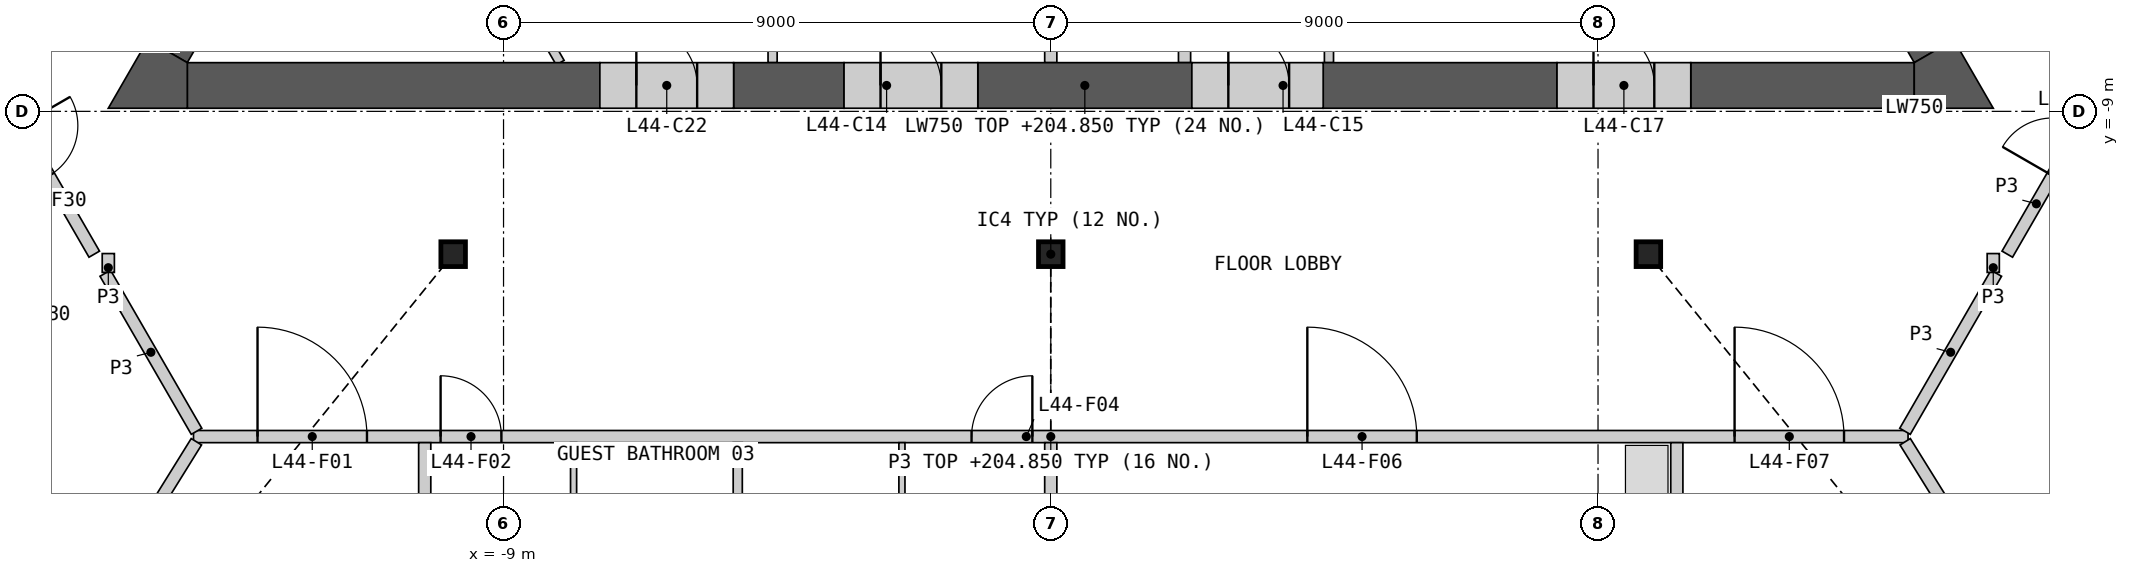
"""IFC4 building model, lengths in metres.
Left out: names, types, materials, properties, quantities, classifications, styles, units other than length and angle.
Written with IfcOpenShell. Run it as: python <this file> out.ifc"""

import sys

from ifc_helpers import new_model, si_unit, direction, frame, frame_2d, origin, origin_2d, place, context, subcontext, project, spatial, polyline, rectangle, i_section, outline, extrude, element, fill, save


model = new_model("IFC4")
c1 = context("Model", 3, precision=1e-05, world=origin(), true_north=direction((0.0, 1.0)))
c2 = subcontext(c1, "Body", "Model", "MODEL_VIEW")
j1 = project(units=[si_unit("LENGTHUNIT", "METRE"), si_unit("PLANEANGLEUNIT", "RADIAN")], contexts=[c1])
p1 = place(None, origin())
s1 = spatial("IfcSite", under=j1, at=p1, CompositionType="ELEMENT")
p2 = place(p1, origin())
s2 = spatial("IfcBuilding", under=s1, at=p2, CompositionType="ELEMENT")
p3 = place(p2, frame((0.0, 0.0, 201.6)))
s3 = spatial("IfcBuildingStorey", under=s2, at=p3, CompositionType="ELEMENT", Elevation=201.6)
for number, where, z_axis, x_axis in (
    (1, (-9.828, -11.349, 0.0), (0.0, 0.0, 1.0), (1.0, 0.0, 0.0)),
    (2, (0.0, -11.349, 0.0), (0.0, 0.0, 1.0), (1.0, 0.0, 0.0)),
    (3, (9.828, -11.349, 0.0), (0.0, 0.0, 1.0), (1.0, 0.0, 0.0)),
):
    element("IfcColumn", number, at=place(p3, frame(where, z_axis=z_axis, x_axis=x_axis)), inside=s3, PredefinedType="COLUMN", context=c2, shape_type="SweptSolid", body=[
        extrude(i_section(OverallWidth=0.404, OverallDepth=0.407, WebThickness=0.027, FlangeThickness=0.044, at=origin_2d()), origin(), (0.0, 0.0, 1.0), 3.6),
    ])
for number, where, z_axis, x_axis in (
    (4, (0.0, -6.906, 0.0), (0.0, 0.0, 1.0), (0.0, -1.0, 0.0)),
    (5, (2.2, -6.906, 0.0), (0.0, 0.0, 1.0), (0.0, -1.0, 0.0)),
):
    element("IfcWall", number, at=place(p3, frame(where, z_axis=z_axis, x_axis=x_axis)), inside=s3, PredefinedType="SHEAR", context=c2, shape_type="SweptSolid", body=[
        extrude(rectangle(XDim=1.293, YDim=0.2, at=frame_2d((0.646, 0.0))), origin(), (0.0, 0.0, 1.0), 3.25),
    ])
for number, where, z_axis, x_axis in (
    (6, (4.575, -6.906, 0.0), (0.0, 0.0, 1.0), (0.0, -1.0, 0.0)),
    (7, (-4.575, -6.906, 0.0), (0.0, 0.0, 1.0), (0.0, -1.0, 0.0)),
):
    element("IfcWall", number, at=place(p3, frame(where, z_axis=z_axis, x_axis=x_axis)), inside=s3, PredefinedType="PARTITIONING", context=c2, shape_type="SweptSolid", body=[
        extrude(rectangle(XDim=1.293, YDim=0.15, at=frame_2d((0.646, 0.0))), origin(), (0.0, 0.0, 1.0), 3.25),
    ])
p4 = place(p3, frame((-8.83, -6.881, 0.0), z_axis=(0.0, 0.0, 1.0), x_axis=(0.500037110984, -0.866003976688, 0.0)))
e8 = element("IfcWall", 8, at=p4, inside=s3, PredefinedType="PARTITIONING", context=c2, shape_type="SweptSolid", body=[
    extrude(rectangle(XDim=1.522, YDim=0.15, at=frame_2d((0.761, 0.0))), origin(), (0.0, 0.0, 1.0), 3.25),
])
p5 = place(p3, frame((-14.201, -8.574, 0.0), z_axis=(0.0, 0.0, 1.0), x_axis=(1.0, 0.0, 0.0)))
e9 = element("IfcWall", 9, at=p5, inside=s3, PredefinedType="SHEAR", context=c2, shape_type="SweptSolid", body=[
    extrude(rectangle(XDim=6.785, YDim=0.75, at=frame_2d((3.393, 0.0))), origin(), (0.0, 0.0, 1.0), 3.25),
])
p6 = place(p3, frame((4.48, -8.574, 0.0), z_axis=(0.0, 0.0, 1.0), x_axis=(1.0, 0.0, 0.0)))
e10 = element("IfcWall", 10, at=p6, inside=s3, PredefinedType="SHEAR", context=c2, shape_type="SweptSolid", body=[
    extrude(rectangle(XDim=3.845, YDim=0.75, at=frame_2d((1.923, 0.0))), origin(), (0.0, 0.0, 1.0), 3.25),
])
p7 = place(p3, frame((10.525, -8.574, 0.0), z_axis=(0.0, 0.0, 1.0), x_axis=(1.0, 0.0, 0.0)))
e11 = element("IfcWall", 11, at=p7, inside=s3, PredefinedType="SHEAR", context=c2, shape_type="SweptSolid", body=[
    extrude(rectangle(XDim=3.676, YDim=0.75, at=frame_2d((1.838, 0.0))), origin(), (0.0, 0.0, 1.0), 3.25),
])
p8 = place(p3, frame((-1.2, -8.574, 0.0), z_axis=(0.0, 0.0, 1.0), x_axis=(1.0, 0.0, 0.0)))
e12 = element("IfcWall", 12, at=p8, inside=s3, PredefinedType="SHEAR", context=c2, shape_type="SweptSolid", body=[
    extrude(rectangle(XDim=3.52, YDim=0.75, at=frame_2d((1.76, 0.0))), origin(), (0.0, 0.0, 1.0), 3.25),
])
p9 = place(p3, frame((-5.216, -8.574, 0.0), z_axis=(0.0, 0.0, 1.0), x_axis=(1.0, 0.0, 0.0)))
e13 = element("IfcWall", 13, at=p9, inside=s3, PredefinedType="SHEAR", context=c2, shape_type="SweptSolid", body=[
    extrude(rectangle(XDim=1.816, YDim=0.75, at=frame_2d((0.908, 0.0))), origin(), (0.0, 0.0, 1.0), 3.25),
])
p10 = place(p3, frame((14.526, -8.011, 0.0), z_axis=(0.0, 0.0, 1.0), x_axis=(-0.499996012963, 0.866027705689, 0.0)))
e14 = element("IfcWall", 14, at=p10, inside=s3, PredefinedType="SHEAR", context=c2, shape_type="SweptSolid", body=[
    extrude(rectangle(XDim=15.039, YDim=0.75, at=frame_2d((7.519, 0.0))), origin(), (0.0, 0.0, 1.0), 3.25),
])
p11 = place(p3, frame((-13.564, -6.346, 0.0), z_axis=(0.0, 0.0, 1.0), x_axis=(-0.499989888488, -0.86603124159, 0.0)))
e15 = element("IfcWall", 15, at=p11, inside=s3, PredefinedType="SHEAR", context=c2, shape_type="SweptSolid", body=[
    extrude(rectangle(XDim=1.923, YDim=0.75, at=frame_2d((0.961, 0.0))), origin(), (0.0, 0.0, 1.0), 3.25),
])
p12 = place(p3, origin())
e16 = element("IfcWall", 16, at=p12, inside=s3, PredefinedType="SHEAR", context=c2, shape_type="SweptSolid", body=[
    extrude(outline(polyline([(14.201, -8.949), (14.201, -8.199), (14.851, -7.824), (15.5, -8.949), (14.201, -8.949)])), origin(), (0.0, 0.0, 1.0), 3.25),
])
p13 = place(p3, origin())
e17 = element("IfcWall", 17, at=p13, inside=s3, PredefinedType="SHEAR", context=c2, shape_type="SweptSolid", body=[
    extrude(outline(polyline([(-14.851, -7.824), (-14.201, -8.199), (-14.201, -8.949), (-15.5, -8.949), (-14.851, -7.824)])), origin(), (0.0, 0.0, 1.0), 3.25),
])
p14 = place(p3, frame((-3.4, -8.574, 0.0), z_axis=(0.0, 0.0, 1.0), x_axis=(1.0, 0.0, 0.0)))
e18 = element("IfcWall", 18, at=p14, inside=s3, PredefinedType="SHEAR", context=c2, shape_type="SweptSolid", body=[
    extrude(rectangle(XDim=2.2, YDim=0.75, at=frame_2d((1.1, 0.0))), origin(), (0.0, 0.0, 1.0), 3.25),
])
p15 = place(p14, frame((0.6, 0.0, 0.0)))
e19 = element("IfcOpeningElement", 19, at=p15, cuts=e18, PredefinedType="OPENING", context=c2, shape_type="SweptSolid", body=[
    extrude(rectangle(XDim=1.0, YDim=2.1, at=frame_2d((0.5, 1.05))), frame((0.0, 0.385, 0.0), z_axis=(0.0, -1.0, 0.0), x_axis=(1.0, 0.0, 0.0)), (0.0, 0.0, 1.0), 0.77),
])
p16 = place(p3, frame((2.32, -8.574, 0.0), z_axis=(0.0, 0.0, 1.0), x_axis=(1.0, 0.0, 0.0)))
e20 = element("IfcWall", 20, at=p16, inside=s3, PredefinedType="SHEAR", context=c2, shape_type="SweptSolid", body=[
    extrude(rectangle(XDim=2.16, YDim=0.75, at=frame_2d((1.08, 0.0))), origin(), (0.0, 0.0, 1.0), 3.25),
])
p17 = place(p16, frame((0.6, 0.0, 0.0)))
e21 = element("IfcOpeningElement", 21, at=p17, cuts=e20, PredefinedType="OPENING", context=c2, shape_type="SweptSolid", body=[
    extrude(rectangle(XDim=1.0, YDim=2.1, at=frame_2d((0.5, 1.05))), frame((0.0, 0.385, 0.0), z_axis=(0.0, -1.0, 0.0), x_axis=(1.0, 0.0, 0.0)), (0.0, 0.0, 1.0), 0.77),
])
p18 = place(p3, frame((8.325, -8.574, 0.0), z_axis=(0.0, 0.0, 1.0), x_axis=(1.0, 0.0, 0.0)))
e22 = element("IfcWall", 22, at=p18, inside=s3, PredefinedType="SHEAR", context=c2, shape_type="SweptSolid", body=[
    extrude(rectangle(XDim=2.2, YDim=0.75, at=frame_2d((1.1, 0.0))), origin(), (0.0, 0.0, 1.0), 3.25),
])
p19 = place(p18, frame((0.6, 0.0, 0.0)))
e23 = element("IfcOpeningElement", 23, at=p19, cuts=e22, PredefinedType="OPENING", context=c2, shape_type="SweptSolid", body=[
    extrude(rectangle(XDim=1.0, YDim=2.1, at=frame_2d((0.5, 1.05))), frame((0.0, 0.385, 0.0), z_axis=(0.0, -1.0, 0.0), x_axis=(1.0, 0.0, 0.0)), (0.0, 0.0, 1.0), 0.77),
])
p20 = place(p3, frame((-7.416, -8.574, 0.0), z_axis=(0.0, 0.0, 1.0), x_axis=(1.0, 0.0, 0.0)))
e24 = element("IfcWall", 24, at=p20, inside=s3, PredefinedType="SHEAR", context=c2, shape_type="SweptSolid", body=[
    extrude(rectangle(XDim=2.2, YDim=0.75, at=frame_2d((1.1, 0.0))), origin(), (0.0, 0.0, 1.0), 3.25),
])
p21 = place(p20, frame((0.6, 0.0, 0.0)))
e25 = element("IfcOpeningElement", 25, at=p21, cuts=e24, PredefinedType="OPENING", context=c2, shape_type="SweptSolid", body=[
    extrude(rectangle(XDim=1.0, YDim=2.1, at=frame_2d((0.5, 1.05))), frame((0.0, 0.385, 0.0), z_axis=(0.0, -1.0, 0.0), x_axis=(1.0, 0.0, 0.0)), (0.0, 0.0, 1.0), 0.77),
])
p22 = place(p3, frame((-14.099, -14.349, 0.0), z_axis=(0.0, 0.0, 1.0), x_axis=(1.0, 0.0, 0.0)))
e26 = element("IfcWall", 26, at=p22, inside=s3, PredefinedType="PARTITIONING", context=c2, shape_type="SweptSolid", body=[
    extrude(rectangle(XDim=28.198, YDim=0.2, at=frame_2d((14.099, 0.0))), origin(), (0.0, 0.0, 1.0), 3.25),
])
p23 = place(p22, frame((1.053, 0.0, 0.0)))
e27 = element("IfcOpeningElement", 27, at=p23, cuts=e26, PredefinedType="OPENING", context=c2, shape_type="SweptSolid", body=[
    extrude(rectangle(XDim=1.8, YDim=2.1, at=frame_2d((0.9, 1.05))), frame((0.0, 0.11, 0.0), z_axis=(0.0, -1.0, 0.0), x_axis=(1.0, 0.0, 0.0)), (0.0, 0.0, 1.0), 0.22),
])
p24 = place(p22, frame((4.064, 0.0, 0.0)))
e28 = element("IfcOpeningElement", 28, at=p24, cuts=e26, PredefinedType="OPENING", context=c2, shape_type="SweptSolid", body=[
    extrude(rectangle(XDim=1.0, YDim=2.1, at=frame_2d((0.5, 1.05))), frame((0.0, 0.11, 0.0), z_axis=(0.0, -1.0, 0.0), x_axis=(1.0, 0.0, 0.0)), (0.0, 0.0, 1.0), 0.22),
])
p25 = place(p22, frame((12.796, 0.0, 0.0)))
e29 = element("IfcOpeningElement", 29, at=p25, cuts=e26, PredefinedType="OPENING", context=c2, shape_type="SweptSolid", body=[
    extrude(rectangle(XDim=1.0, YDim=2.1, at=frame_2d((0.5, 1.05))), frame((0.0, 0.11, 0.0), z_axis=(0.0, -1.0, 0.0), x_axis=(1.0, 0.0, 0.0)), (0.0, 0.0, 1.0), 0.22),
])
p26 = place(p22, frame((18.318, 0.0, 0.0)))
e30 = element("IfcOpeningElement", 30, at=p26, cuts=e26, PredefinedType="OPENING", context=c2, shape_type="SweptSolid", body=[
    extrude(rectangle(XDim=1.8, YDim=2.1, at=frame_2d((0.9, 1.05))), frame((0.0, 0.11, 0.0), z_axis=(0.0, -1.0, 0.0), x_axis=(1.0, 0.0, 0.0)), (0.0, 0.0, 1.0), 0.22),
])
p27 = place(p22, frame((25.345, 0.0, 0.0)))
e31 = element("IfcOpeningElement", 31, at=p27, cuts=e26, PredefinedType="OPENING", context=c2, shape_type="SweptSolid", body=[
    extrude(rectangle(XDim=1.8, YDim=2.1, at=frame_2d((0.9, 1.05))), frame((0.0, 0.11, 0.0), z_axis=(0.0, -1.0, 0.0), x_axis=(1.0, 0.0, 0.0)), (0.0, 0.0, 1.0), 0.22),
])
p28 = place(p3, frame((14.971, -3.233, 0.0), z_axis=(0.0, 0.0, 1.0), x_axis=(0.500003221507, -0.866023543838, 0.0)))
e32 = element("IfcWall", 32, at=p28, inside=s3, PredefinedType="PARTITIONING", context=c2, shape_type="SweptSolid", body=[
    extrude(rectangle(XDim=5.545, YDim=0.2, at=frame_2d((2.772, 0.0))), origin(), (0.0, 0.0, 1.0), 3.25),
])
p29 = place(p28, frame((4.094, 0.0, 0.0)))
e33 = element("IfcOpeningElement", 33, at=p29, cuts=e32, PredefinedType="OPENING", context=c2, shape_type="SweptSolid", body=[
    extrude(rectangle(XDim=1.1, YDim=2.1, at=frame_2d((0.55, 1.05))), frame((0.0, 0.11, 0.0), z_axis=(0.0, -1.0, 0.0), x_axis=(1.0, 0.0, 0.0)), (0.0, 0.0, 1.0), 0.22),
])
p30 = place(p3, frame((-17.744, -8.035, 0.0), z_axis=(0.0, 0.0, 1.0), x_axis=(0.500003221507, 0.866023543838, 0.0)))
e34 = element("IfcWall", 34, at=p30, inside=s3, PredefinedType="PARTITIONING", context=c2, shape_type="SweptSolid", body=[
    extrude(rectangle(XDim=5.545, YDim=0.2, at=frame_2d((2.772, 0.0))), origin(), (0.0, 0.0, 1.0), 3.25),
])
p31 = place(p30, frame((0.351, 0.0, 0.0)))
e35 = element("IfcOpeningElement", 35, at=p31, cuts=e34, PredefinedType="OPENING", context=c2, shape_type="SweptSolid", body=[
    extrude(rectangle(XDim=1.1, YDim=2.1, at=frame_2d((0.55, 1.05))), frame((0.0, 0.11, 0.0), z_axis=(0.0, -1.0, 0.0), x_axis=(1.0, 0.0, 0.0)), (0.0, 0.0, 1.0), 0.22),
])
p32 = place(p3, frame((15.731, -11.349, 0.0), z_axis=(0.0, 0.0, 1.0), x_axis=(0.499961815444, 0.866047448526, 0.0)))
e36 = element("IfcWall", 36, at=p32, inside=s3, PredefinedType="PARTITIONING", context=c2, shape_type="SweptSolid", body=[
    extrude(rectangle(XDim=3.826, YDim=0.2, at=frame_2d((1.913, 0.0))), origin(), (0.0, 0.0, 1.0), 3.25),
])
p33 = place(p32, frame((1.49, 0.0, 0.0)))
e37 = element("IfcOpeningElement", 37, at=p33, cuts=e36, PredefinedType="OPENING", context=c2, shape_type="SweptSolid", body=[
    extrude(rectangle(XDim=0.95, YDim=2.1, at=frame_2d((0.475, 1.05))), frame((0.0, 0.11, 0.0), z_axis=(0.0, -1.0, 0.0), x_axis=(1.0, 0.0, 0.0)), (0.0, 0.0, 1.0), 0.22),
])
p34 = place(p3, frame((-17.644, -8.035, 0.0), z_axis=(0.0, 0.0, 1.0), x_axis=(0.499961815444, -0.866047448526, 0.0)))
e38 = element("IfcWall", 38, at=p34, inside=s3, PredefinedType="PARTITIONING", context=c2, shape_type="SweptSolid", body=[
    extrude(rectangle(XDim=3.826, YDim=0.2, at=frame_2d((1.913, 0.0))), origin(), (0.0, 0.0, 1.0), 3.25),
])
p35 = place(p34, frame((1.386, 0.0, 0.0)))
e39 = element("IfcOpeningElement", 39, at=p35, cuts=e38, PredefinedType="OPENING", context=c2, shape_type="SweptSolid", body=[
    extrude(rectangle(XDim=0.95, YDim=2.1, at=frame_2d((0.475, 1.05))), frame((0.0, 0.11, 0.0), z_axis=(0.0, -1.0, 0.0), x_axis=(1.0, 0.0, 0.0)), (0.0, 0.0, 1.0), 0.22),
])
for number, where, z_axis, x_axis in (
    (40, (14.049, -14.262, 0.0), (0.0, 0.0, 1.0), (0.5, 0.866, 0.0)),
    (41, (-15.55, -11.662, 0.0), (0.0, 0.0, 1.0), (0.5, -0.866, 0.0)),
):
    element("IfcWall", number, at=place(p3, frame(where, z_axis=z_axis, x_axis=x_axis)), inside=s3, PredefinedType="PARTITIONING", context=c2, shape_type="SweptSolid", body=[
        extrude(rectangle(XDim=3.002, YDim=0.2, at=frame_2d((1.501, 0.0))), origin(), (0.0, 0.0, 1.0), 3.25),
    ])
for number, where, z_axis, x_axis in (
    (42, (-15.5, -11.649, 0.0), (0.0, 0.0, 1.0), (0.0, 1.0, 0.0)),
    (43, (15.5, -11.649, 0.0), (0.0, 0.0, 1.0), (0.0, 1.0, 0.0)),
):
    element("IfcWall", number, at=place(p3, frame(where, z_axis=z_axis, x_axis=x_axis)), inside=s3, PredefinedType="PARTITIONING", context=c2, shape_type="SweptSolid", body=[
        extrude(rectangle(XDim=0.31, YDim=0.2, at=frame_2d((0.155, 0.0))), origin(), (0.0, 0.0, 1.0), 3.25),
    ])
p36 = place(p3, frame((14.052, -14.434, 0.0), z_axis=(0.0, 0.0, 1.0), x_axis=(0.527581174538, -0.849504622868, 0.0)))
e44 = element("IfcWall", 44, at=p36, inside=s3, PredefinedType="PARTITIONING", context=c2, shape_type="SweptSolid", body=[
    extrude(rectangle(XDim=11.747, YDim=0.2, at=frame_2d((5.873, 0.0))), origin(), (0.0, 0.0, 1.0), 2.404),
])
p37 = place(p3, frame((-20.117, -24.2, 0.0), z_axis=(0.0, 0.0, 1.0), x_axis=(0.527576403825, 0.849507585679, 0.0)))
e45 = element("IfcWall", 45, at=p37, inside=s3, PredefinedType="PARTITIONING", context=c2, shape_type="SweptSolid", body=[
    extrude(rectangle(XDim=11.497, YDim=0.2, at=frame_2d((5.749, 0.0))), origin(), (0.0, 0.0, 1.0), 2.404),
])
for number, where, z_axis, x_axis in (
    (46, (-10.296, -24.312, 0.0), (0.0, 0.0, 1.0), (0.0, 1.0, 0.0)),
    (47, (0.0, -24.312, 0.0), (0.0, 0.0, 1.0), (0.0, 1.0, 0.0)),
    (48, (10.296, -24.312, 0.0), (0.0, 0.0, 1.0), (0.0, 1.0, 0.0)),
):
    element("IfcWall", number, at=place(p3, frame(where, z_axis=z_axis, x_axis=x_axis)), inside=s3, PredefinedType="PARTITIONING", context=c2, shape_type="SweptSolid", body=[
        extrude(rectangle(XDim=9.863, YDim=0.2, at=frame_2d((4.931, 0.0))), origin(), (0.0, 0.0, 1.0), 2.404),
    ])
p38 = place(p3, frame((-19.822, -11.562, 0.0), z_axis=(0.0, 0.0, 1.0), x_axis=(0.500008997517, -0.866020209003, 0.0)))
e49 = element("IfcWall", 49, at=p38, inside=s3, PredefinedType="PARTITIONING", context=c2, shape_type="SweptSolid", body=[
    extrude(rectangle(XDim=7.178, YDim=0.2, at=frame_2d((3.589, 0.0))), origin(), (0.0, 0.0, 1.0), 2.404),
])
p39 = place(p38, frame((2.059, 0.0, 0.0)))
e50 = element("IfcOpeningElement", 50, at=p39, cuts=e49, PredefinedType="OPENING", context=c2, shape_type="SweptSolid", body=[
    extrude(rectangle(XDim=0.95, YDim=2.1, at=frame_2d((0.475, 1.05))), frame((0.0, 0.11, 0.0), z_axis=(0.0, -1.0, 0.0), x_axis=(1.0, 0.0, 0.0)), (0.0, 0.0, 1.0), 0.22),
])
p40 = place(p3, frame((16.233, -17.779, 0.0), z_axis=(0.0, 0.0, 1.0), x_axis=(0.500008997517, 0.866020209003, 0.0)))
e51 = element("IfcWall", 51, at=p40, inside=s3, PredefinedType="PARTITIONING", context=c2, shape_type="SweptSolid", body=[
    extrude(rectangle(XDim=7.178, YDim=0.2, at=frame_2d((3.589, 0.0))), origin(), (0.0, 0.0, 1.0), 2.404),
])
p41 = place(p40, frame((4.973, 0.0, 0.0)))
e52 = element("IfcOpeningElement", 52, at=p41, cuts=e51, PredefinedType="OPENING", context=c2, shape_type="SweptSolid", body=[
    extrude(rectangle(XDim=0.95, YDim=2.1, at=frame_2d((0.475, 1.05))), frame((0.0, 0.11, 0.0), z_axis=(0.0, -1.0, 0.0), x_axis=(1.0, 0.0, 0.0)), (0.0, 0.0, 1.0), 0.22),
])
p42 = place(p3, frame((-5.148, -16.899, 0.0), z_axis=(0.0, 0.0, 1.0), x_axis=(0.0, 1.0, 0.0)))
e53 = element("IfcWall", 53, at=p42, inside=s3, PredefinedType="PLUMBINGWALL", context=c2, shape_type="SweptSolid", body=[
    extrude(rectangle(XDim=2.45, YDim=0.15, at=frame_2d((1.225, 0.0))), origin(), (0.0, 0.0, 1.0), 2.404),
])
for number, where, z_axis, x_axis in (
    (54, (-7.848, -16.899, 0.0), (0.0, 0.0, 1.0), (0.0, 1.0, 0.0)),
    (55, (-2.448, -16.899, 0.0), (0.0, 0.0, 1.0), (0.0, 1.0, 0.0)),
):
    element("IfcWall", number, at=place(p3, frame(where, z_axis=z_axis, x_axis=x_axis)), inside=s3, PredefinedType="PARTITIONING", context=c2, shape_type="SweptSolid", body=[
        extrude(rectangle(XDim=2.45, YDim=0.1, at=frame_2d((1.225, 0.0))), origin(), (0.0, 0.0, 1.0), 2.404),
    ])
p43 = place(p15, origin())
e56 = element("IfcDoor", 56, at=p43, inside=s3, OperationType="SINGLE_SWING_LEFT", PredefinedType="DOOR", context=c2, shape_type="SweptSolid", body=[
    extrude(rectangle(XDim=1.0, YDim=2.1, at=frame_2d((0.5, 1.05))), frame((0.0, 0.13, 0.0), z_axis=(0.0, -1.0, 0.0), x_axis=(1.0, 0.0, 0.0)), (0.0, 0.0, 1.0), 0.05),
])
fill(e19, e56)
p44 = place(p17, origin())
e57 = element("IfcDoor", 57, at=p44, inside=s3, OperationType="SINGLE_SWING_LEFT", PredefinedType="DOOR", context=c2, shape_type="SweptSolid", body=[
    extrude(rectangle(XDim=1.0, YDim=2.1, at=frame_2d((0.5, 1.05))), frame((0.0, 0.13, 0.0), z_axis=(0.0, -1.0, 0.0), x_axis=(1.0, 0.0, 0.0)), (0.0, 0.0, 1.0), 0.05),
])
fill(e21, e57)
p45 = place(p19, origin())
e58 = element("IfcDoor", 58, at=p45, inside=s3, OperationType="SINGLE_SWING_LEFT", PredefinedType="DOOR", context=c2, shape_type="SweptSolid", body=[
    extrude(rectangle(XDim=1.0, YDim=2.1, at=frame_2d((0.5, 1.05))), frame((0.0, 0.13, 0.0), z_axis=(0.0, -1.0, 0.0), x_axis=(1.0, 0.0, 0.0)), (0.0, 0.0, 1.0), 0.05),
])
fill(e23, e58)
p46 = place(p21, origin())
e59 = element("IfcDoor", 59, at=p46, inside=s3, OperationType="SINGLE_SWING_LEFT", PredefinedType="DOOR", context=c2, shape_type="SweptSolid", body=[
    extrude(rectangle(XDim=1.0, YDim=2.1, at=frame_2d((0.5, 1.05))), frame((0.0, 0.13, 0.0), z_axis=(0.0, -1.0, 0.0), x_axis=(1.0, 0.0, 0.0)), (0.0, 0.0, 1.0), 0.05),
])
fill(e25, e59)
p47 = place(p23, origin())
e60 = element("IfcDoor", 60, at=p47, inside=s3, OperationType="DOUBLE_DOOR_SINGLE_SWING", PredefinedType="DOOR", context=c2, shape_type="SweptSolid", body=[
    extrude(rectangle(XDim=1.8, YDim=2.1, at=frame_2d((0.9, 1.05))), frame((0.0, 0.025, 0.0), z_axis=(0.0, -1.0, 0.0), x_axis=(1.0, 0.0, 0.0)), (0.0, 0.0, 1.0), 0.05),
])
fill(e27, e60)
p48 = place(p24, origin())
e61 = element("IfcDoor", 61, at=p48, inside=s3, OperationType="SINGLE_SWING_LEFT", PredefinedType="DOOR", context=c2, shape_type="SweptSolid", body=[
    extrude(rectangle(XDim=1.0, YDim=2.1, at=frame_2d((0.5, 1.05))), frame((0.0, 0.025, 0.0), z_axis=(0.0, -1.0, 0.0), x_axis=(1.0, 0.0, 0.0)), (0.0, 0.0, 1.0), 0.05),
])
fill(e28, e61)
p49 = place(p25, origin())
e62 = element("IfcDoor", 62, at=p49, inside=s3, OperationType="SINGLE_SWING_RIGHT", PredefinedType="DOOR", context=c2, shape_type="SweptSolid", body=[
    extrude(rectangle(XDim=1.0, YDim=2.1, at=frame_2d((0.5, 1.05))), frame((0.0, 0.025, 0.0), z_axis=(0.0, -1.0, 0.0), x_axis=(1.0, 0.0, 0.0)), (0.0, 0.0, 1.0), 0.05),
])
fill(e29, e62)
p50 = place(p26, origin())
e63 = element("IfcDoor", 63, at=p50, inside=s3, OperationType="DOUBLE_DOOR_SINGLE_SWING", PredefinedType="DOOR", context=c2, shape_type="SweptSolid", body=[
    extrude(rectangle(XDim=1.8, YDim=2.1, at=frame_2d((0.9, 1.05))), frame((0.0, 0.025, 0.0), z_axis=(0.0, -1.0, 0.0), x_axis=(1.0, 0.0, 0.0)), (0.0, 0.0, 1.0), 0.05),
])
fill(e30, e63)
p51 = place(p27, origin())
e64 = element("IfcDoor", 64, at=p51, inside=s3, OperationType="DOUBLE_DOOR_SINGLE_SWING", PredefinedType="DOOR", context=c2, shape_type="SweptSolid", body=[
    extrude(rectangle(XDim=1.8, YDim=2.1, at=frame_2d((0.9, 1.05))), frame((0.0, 0.025, 0.0), z_axis=(0.0, -1.0, 0.0), x_axis=(1.0, 0.0, 0.0)), (0.0, 0.0, 1.0), 0.05),
])
fill(e31, e64)
save(model, sys.argv[1])
